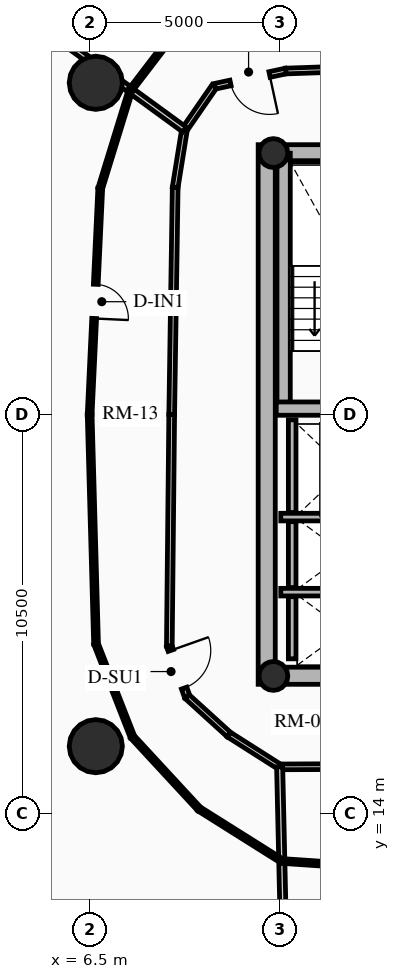
"""IFC4 building model, lengths in metres.
Left out: names, types, materials, properties, quantities, classifications, styles, units other than length and angle.
Written with IfcOpenShell. Run it as: python <this file> out.ifc"""

import sys

from ifc_helpers import new_model, si_unit, direction, frame, frame_2d, origin, origin_2d, place, context, subcontext, project, spatial, rectangle, circle, hollow_circle, extrude, source, transform, mapped, element, fill, save


model = new_model("IFC4")
c1 = context("Model", 3, precision=1e-05, world=origin(), true_north=direction((0.0, 1.0)))
c2 = subcontext(c1, "Body", "Model", "MODEL_VIEW")
j1 = project(units=[si_unit("LENGTHUNIT", "METRE"), si_unit("PLANEANGLEUNIT", "RADIAN")], contexts=[c1])
p1 = place(None, origin())
s1 = spatial("IfcSite", under=j1, at=p1, CompositionType="ELEMENT")
p2 = place(p1, origin())
s2 = spatial("IfcBuilding", under=s1, at=p2, CompositionType="ELEMENT")
p3 = place(p2, frame((0.0, 0.0, 90.52)))
s3 = spatial("IfcBuildingStorey", under=s2, at=p3, CompositionType="ELEMENT", Elevation=90.52)
p4 = place(p3, frame((11.15, 17.4, 0.0), z_axis=(0.0, 0.0, 1.0), x_axis=(0.0, 1.0, 0.0)))
e1 = element("IfcWall", 1, at=p4, inside=s3, PredefinedType="SHEAR", context=c2, shape_type="SweptSolid", body=[
    extrude(rectangle(XDim=14.2, YDim=0.45, at=frame_2d((7.1, 0.0))), origin(), (0.0, 0.0, 1.0), 2.91),
])
p5 = place(p3, frame((11.15, 17.625, 0.0), z_axis=(0.0, 0.0, 1.0), x_axis=(1.0, 0.0, 0.0)))
e2 = element("IfcWall", 2, at=p5, inside=s3, PredefinedType="SHEAR", context=c2, shape_type="SweptSolid", body=[
    extrude(rectangle(XDim=10.7, YDim=0.45, at=frame_2d((5.35, 0.0))), origin(), (0.0, 0.0, 1.0), 2.91),
])
m1 = source(origin(), c2, "Body", "SweptSolid", [
    extrude(rectangle(XDim=1.5, YDim=2.02, at=frame_2d((0.75, 1.01))), frame((0.0, 0.235, 0.0), z_axis=(0.0, -1.0, 0.0), x_axis=(1.0, 0.0, 0.0)), (0.0, 0.0, 1.0), 0.47),
])
p6 = place(p5, frame((5.45, 0.0, 0.0)))
e3 = element("IfcOpeningElement", 3, at=p6, cuts=e2, PredefinedType="OPENING", context=c2, shape_type="MappedRepresentation", body=[
    mapped(m1, transform((0.0, 0.0, 0.0), x_axis=(1.0, 0.0, 0.0), y_axis=(0.0, 1.0, 0.0), z_axis=(0.0, 0.0, 1.0), scale=1.0)),
])
p7 = place(p3, frame((11.15, 31.375, 0.0), z_axis=(0.0, 0.0, 1.0), x_axis=(1.0, 0.0, 0.0)))
e4 = element("IfcWall", 4, at=p7, inside=s3, PredefinedType="SHEAR", context=c2, shape_type="SweptSolid", body=[
    extrude(rectangle(XDim=10.7, YDim=0.45, at=frame_2d((5.35, 0.0))), origin(), (0.0, 0.0, 1.0), 2.91),
])
p8 = place(p7, frame((4.6, 0.0, 0.0)))
e5 = element("IfcOpeningElement", 5, at=p8, cuts=e4, PredefinedType="OPENING", context=c2, shape_type="MappedRepresentation", body=[
    mapped(m1, transform((0.0, 0.0, 0.0), x_axis=(1.0, 0.0, 0.0), y_axis=(0.0, 1.0, 0.0), z_axis=(0.0, 0.0, 1.0), scale=1.0)),
])
p9 = place(p3, frame((11.595, 24.655, 0.0), z_axis=(0.0, 0.0, 1.0), x_axis=(0.0, 1.0, 0.0)))
e6 = element("IfcWall", 6, at=p9, inside=s3, PredefinedType="SHEAR", context=c2, shape_type="SweptSolid", body=[
    extrude(rectangle(XDim=6.72, YDim=0.35, at=frame_2d((3.36, 0.0))), origin(), (0.0, 0.0, 1.0), 2.91),
])
p10 = place(p3, frame((11.4, 24.655, 0.0), z_axis=(0.0, 0.0, 1.0), x_axis=(1.0, 0.0, 0.0)))
e7 = element("IfcWall", 7, at=p10, inside=s3, PredefinedType="SHEAR", context=c2, shape_type="SweptSolid", body=[
    extrude(rectangle(XDim=3.285, YDim=0.35, at=frame_2d((1.643, 0.0))), origin(), (0.0, 0.0, 1.0), 2.91),
])
for number, where, z_axis, x_axis in (
    (8, (11.325, 17.62, 0.0), (0.0, 0.0, 1.0), (1.0, 0.0, 0.0)),
    (9, (11.325, 31.38, 0.0), (0.0, 0.0, 1.0), (1.0, 0.0, 0.0)),
):
    element("IfcColumn", number, at=place(p3, frame(where, z_axis=z_axis, x_axis=x_axis)), inside=s3, PredefinedType="COLUMN", context=c2, shape_type="SweptSolid", body=[
        extrude(hollow_circle(Radius=0.38, WallThickness=0.032, at=origin_2d()), origin(), (0.0, 0.0, 1.0), 2.91),
    ])
for number, where, z_axis, x_axis in (
    (10, (6.653, 33.229, 0.0), (0.0, 0.0, 1.0), (1.0, 0.0, 0.0)),
    (11, (6.653, 15.771, 0.0), (0.0, 0.0, 1.0), (1.0, 0.0, 0.0)),
):
    element("IfcColumn", number, at=place(p3, frame(where, z_axis=z_axis, x_axis=x_axis)), inside=s3, PredefinedType="USERDEFINED", context=c2, shape_type="SweptSolid", body=[
        extrude(circle(Radius=0.7, at=origin_2d()), origin(), (0.0, 0.0, 1.0), 2.91),
    ])
p11 = place(p3, frame((7.342, 9.072, 0.0), z_axis=(0.0, 0.0, 1.0), x_axis=(-0.632700781152, 0.77439635945, 0.0)))
e12 = element("IfcWall", 12, at=p11, inside=s3, PredefinedType="SOLIDWALL", context=c2, shape_type="SweptSolid", body=[
    extrude(rectangle(XDim=5.448, YDim=0.24, at=frame_2d((2.724, 0.0))), origin(), (0.0, 0.0, 1.0), 2.179),
])
p12 = place(p3, frame((11.52, 21.8, 0.0), z_axis=(0.0, 0.0, 1.0), x_axis=(1.0, 0.0, 0.0)))
e13 = element("IfcWall", 13, at=p12, inside=s3, PredefinedType="SHEAR", context=c2, shape_type="SweptSolid", body=[
    extrude(rectangle(XDim=2.97, YDim=0.2, at=frame_2d((1.485, 0.0))), origin(), (0.0, 0.0, 1.0), 2.91),
])
p13 = place(p3, frame((11.82, 21.92, 0.0), z_axis=(0.0, 0.0, 1.0), x_axis=(0.0, 1.0, 0.0)))
e14 = element("IfcWall", 14, at=p13, inside=s3, PredefinedType="SHEAR", context=c2, shape_type="SweptSolid", body=[
    extrude(rectangle(XDim=2.44, YDim=0.2, at=frame_2d((1.22, 0.0))), origin(), (0.0, 0.0, 1.0), 2.91),
])
p14 = place(p3, frame((11.52, 19.825, 0.0), z_axis=(0.0, 0.0, 1.0), x_axis=(1.0, 0.0, 0.0)))
e15 = element("IfcWall", 15, at=p14, inside=s3, PredefinedType="SHEAR", context=c2, shape_type="SweptSolid", body=[
    extrude(rectangle(XDim=2.97, YDim=0.2, at=frame_2d((1.485, 0.0))), origin(), (0.0, 0.0, 1.0), 2.91),
])
p15 = place(p3, frame((11.82, 19.945, 0.0), z_axis=(0.0, 0.0, 1.0), x_axis=(0.0, 1.0, 0.0)))
e16 = element("IfcWall", 16, at=p15, inside=s3, PredefinedType="SHEAR", context=c2, shape_type="SweptSolid", body=[
    extrude(rectangle(XDim=1.735, YDim=0.2, at=frame_2d((0.867, 0.0))), origin(), (0.0, 0.0, 1.0), 2.91),
])
p16 = place(p3, frame((11.82, 18.07, 0.0), z_axis=(0.0, 0.0, 1.0), x_axis=(0.0, 1.0, 0.0)))
e17 = element("IfcWall", 17, at=p16, inside=s3, PredefinedType="SHEAR", context=c2, shape_type="SweptSolid", body=[
    extrude(rectangle(XDim=1.635, YDim=0.2, at=frame_2d((0.817, 0.0))), origin(), (0.0, 0.0, 1.0), 2.91),
])
p17 = place(p3, frame((18.133, 33.76, 0.0), z_axis=(0.0, 0.0, 1.0), x_axis=(-0.999419643988, -0.034064280574, 0.0)))
e18 = element("IfcWall", 18, at=p17, inside=s3, PredefinedType="PARTITIONING", context=c2, shape_type="SweptSolid", body=[
    extrude(rectangle(XDim=6.486, YDim=0.15, at=frame_2d((3.243, 0.0))), origin(), (0.0, 0.0, 1.0), 2.225),
])
p18 = place(p3, frame((11.65, 33.539, 0.0), z_axis=(0.0, 0.0, 1.0), x_axis=(-0.977535921581, -0.210768882949, 0.0)))
e19 = element("IfcWall", 19, at=p18, inside=s3, PredefinedType="PARTITIONING", context=c2, shape_type="SweptSolid", body=[
    extrude(rectangle(XDim=1.923, YDim=0.15, at=frame_2d((0.961, 0.0))), origin(), (0.0, 0.0, 1.0), 2.225),
])
m2 = source(origin(), c2, "Body", "SweptSolid", [
    extrude(rectangle(XDim=1.05, YDim=2.015, at=frame_2d((0.525, 1.007))), frame((0.0, 0.085, 0.0), z_axis=(0.0, -1.0, 0.0), x_axis=(1.0, 0.0, 0.0)), (0.0, 0.0, 1.0), 0.17),
])
p19 = place(p18, frame((0.436, 0.0, 0.0)))
e20 = element("IfcOpeningElement", 20, at=p19, cuts=e19, PredefinedType="OPENING", context=c2, shape_type="MappedRepresentation", body=[
    mapped(m2, transform((0.0, 0.0, 0.0), x_axis=(1.0, 0.0, 0.0), y_axis=(0.0, 1.0, 0.0), z_axis=(0.0, 0.0, 1.0), scale=1.0)),
])
p20 = place(p3, frame((9.771, 33.133, 0.0), z_axis=(0.0, 0.0, 1.0), x_axis=(-0.568464531016, -0.822707771312, 0.0)))
e21 = element("IfcWall", 21, at=p20, inside=s3, PredefinedType="PARTITIONING", context=c2, shape_type="SweptSolid", body=[
    extrude(rectangle(XDim=1.38, YDim=0.15, at=frame_2d((0.69, 0.0))), origin(), (0.0, 0.0, 1.0), 2.225),
])
p21 = place(p3, frame((8.986, 31.998, 0.0), z_axis=(0.0, 0.0, 1.0), x_axis=(-0.158992972351, -0.98727971454, 0.0)))
e22 = element("IfcWall", 22, at=p21, inside=s3, PredefinedType="PARTITIONING", context=c2, shape_type="SweptSolid", body=[
    extrude(rectangle(XDim=1.539, YDim=0.15, at=frame_2d((0.769, 0.0))), origin(), (0.0, 0.0, 1.0), 2.225),
])
p22 = place(p3, frame((8.742, 30.479, 0.0), z_axis=(0.0, 0.0, 1.0), x_axis=(-0.015351396174, -0.999882160375, 0.0)))
e23 = element("IfcWall", 23, at=p22, inside=s3, PredefinedType="PARTITIONING", context=c2, shape_type="SweptSolid", body=[
    extrude(rectangle(XDim=5.98, YDim=0.15, at=frame_2d((2.99, 0.0))), origin(), (0.0, 0.0, 1.0), 2.655),
])
p23 = place(p3, frame((8.65, 24.5, 0.0), z_axis=(0.0, 0.0, 1.0), x_axis=(-0.010250943023, -0.999947457703, 0.0)))
e24 = element("IfcWall", 24, at=p23, inside=s3, PredefinedType="PARTITIONING", context=c2, shape_type="SweptSolid", body=[
    extrude(rectangle(XDim=6.097, YDim=0.15, at=frame_2d((3.048, 0.0))), origin(), (0.0, 0.0, 1.0), 2.225),
])
p24 = place(p3, frame((8.587, 18.403, 0.0), z_axis=(0.0, 0.0, 1.0), x_axis=(0.333119120686, -0.942884749815, 0.0)))
e25 = element("IfcWall", 25, at=p24, inside=s3, PredefinedType="PARTITIONING", context=c2, shape_type="SweptSolid", body=[
    extrude(rectangle(XDim=1.409, YDim=0.15, at=frame_2d((0.705, 0.0))), origin(), (0.0, 0.0, 1.0), 2.225),
])
p25 = place(p24, frame((0.12, 0.0, 0.0)))
e26 = element("IfcOpeningElement", 26, at=p25, cuts=e25, PredefinedType="OPENING", context=c2, shape_type="MappedRepresentation", body=[
    mapped(m2, transform((0.0, 0.0, 0.0), x_axis=(1.0, 0.0, 0.0), y_axis=(0.0, 1.0, 0.0), z_axis=(0.0, 0.0, 1.0), scale=1.0)),
])
p26 = place(p3, frame((9.057, 17.074, 0.0), z_axis=(0.0, 0.0, 1.0), x_axis=(0.739999571423, -0.672607340351, 0.0)))
e27 = element("IfcWall", 27, at=p26, inside=s3, PredefinedType="PARTITIONING", context=c2, shape_type="SweptSolid", body=[
    extrude(rectangle(XDim=1.485, YDim=0.15, at=frame_2d((0.743, 0.0))), origin(), (0.0, 0.0, 1.0), 2.225),
])
p27 = place(p3, frame((10.156, 16.075, 0.0), z_axis=(0.0, 0.0, 1.0), x_axis=(0.843896624713, -0.536505812455, 0.0)))
e28 = element("IfcWall", 28, at=p27, inside=s3, PredefinedType="PARTITIONING", context=c2, shape_type="SweptSolid", body=[
    extrude(rectangle(XDim=1.581, YDim=0.15, at=frame_2d((0.791, 0.0))), origin(), (0.0, 0.0, 1.0), 2.225),
])
p28 = place(p3, frame((11.49, 15.227, 0.0), z_axis=(0.0, 0.0, 1.0), x_axis=(0.999991728046, 0.004067411998, 0.0)))
e29 = element("IfcWall", 29, at=p28, inside=s3, PredefinedType="PARTITIONING", context=c2, shape_type="SweptSolid", body=[
    extrude(rectangle(XDim=3.301, YDim=0.15, at=frame_2d((1.651, 0.0))), origin(), (0.0, 0.0, 1.0), 2.225),
])
p29 = place(p3, frame((8.986, 31.998, 0.0), z_axis=(0.0, 0.0, 1.0), x_axis=(-0.808130498411, 0.589003478375, 0.0)))
e30 = element("IfcWall", 30, at=p29, inside=s3, PredefinedType="PARTITIONING", context=c2, shape_type="SweptSolid", body=[
    extrude(rectangle(XDim=6.281, YDim=0.16, at=frame_2d((3.14, 0.0))), origin(), (0.0, 0.0, 1.0), 2.179),
])
p30 = place(p3, frame((11.49, 15.227, 0.0), z_axis=(0.0, 0.0, 1.0), x_axis=(0.022711375682, -0.999742063442, 0.0)))
e31 = element("IfcWall", 31, at=p30, inside=s3, PredefinedType="PARTITIONING", context=c2, shape_type="SweptSolid", body=[
    extrude(rectangle(XDim=8.847, YDim=0.16, at=frame_2d((4.423, 0.0))), origin(), (0.0, 0.0, 1.0), 2.179),
])
p31 = place(p3, frame((9.094, 35.031, 0.0), z_axis=(0.0, 0.0, 1.0), x_axis=(-0.607813927368, -0.794079485755, 0.0)))
e32 = element("IfcWall", 32, at=p31, inside=s3, PredefinedType="PARTITIONING", context=c2, shape_type="SweptSolid", body=[
    extrude(rectangle(XDim=2.515, YDim=0.125, at=frame_2d((1.258, 0.0))), origin(), (0.0, 0.0, 1.0), 2.655),
])
p32 = place(p3, frame((7.565, 33.034, 0.0), z_axis=(0.0, 0.0, 1.0), x_axis=(-0.294365365095, -0.955692958974, 0.0)))
e33 = element("IfcWall", 33, at=p32, inside=s3, PredefinedType="PARTITIONING", context=c2, shape_type="SweptSolid", body=[
    extrude(rectangle(XDim=2.7, YDim=0.125, at=frame_2d((1.35, 0.0))), origin(), (0.0, 0.0, 1.0), 2.225),
])
p33 = place(p3, frame((6.77, 30.453, 0.0), z_axis=(0.0, 0.0, 1.0), x_axis=(-0.046864461883, -0.998901257489, 0.0)))
e34 = element("IfcWall", 34, at=p33, inside=s3, PredefinedType="PARTITIONING", context=c2, shape_type="SweptSolid", body=[
    extrude(rectangle(XDim=5.96, YDim=0.125, at=frame_2d((2.98, 0.0))), origin(), (0.0, 0.0, 1.0), 2.655),
])
m3 = source(origin(), c2, "Body", "SweptSolid", [
    extrude(rectangle(XDim=0.9, YDim=2.005, at=frame_2d((0.45, 1.002))), frame((0.0, 0.073, 0.0), z_axis=(0.0, -1.0, 0.0), x_axis=(1.0, 0.0, 0.0)), (0.0, 0.0, 1.0), 0.145),
])
p34 = place(p33, frame((2.53, 0.0, 0.0)))
e35 = element("IfcOpeningElement", 35, at=p34, cuts=e34, PredefinedType="OPENING", context=c2, shape_type="MappedRepresentation", body=[
    mapped(m3, transform((0.0, 0.0, 0.0), x_axis=(1.0, 0.0, 0.0), y_axis=(0.0, 1.0, 0.0), z_axis=(0.0, 0.0, 1.0), scale=1.0)),
])
p35 = place(p3, frame((6.491, 24.5, 0.0), z_axis=(0.0, 0.0, 1.0), x_axis=(0.027808577393, -0.99961326673, 0.0)))
e36 = element("IfcWall", 36, at=p35, inside=s3, PredefinedType="PARTITIONING", context=c2, shape_type="SweptSolid", body=[
    extrude(rectangle(XDim=6.04, YDim=0.125, at=frame_2d((3.02, 0.0))), origin(), (0.0, 0.0, 1.0), 2.225),
])
p36 = place(p3, frame((6.659, 18.462, 0.0), z_axis=(0.0, 0.0, 1.0), x_axis=(0.364644852064, -0.931146675805, 0.0)))
e37 = element("IfcWall", 37, at=p36, inside=s3, PredefinedType="PARTITIONING", context=c2, shape_type="SweptSolid", body=[
    extrude(rectangle(XDim=2.625, YDim=0.125, at=frame_2d((1.312, 0.0))), origin(), (0.0, 0.0, 1.0), 2.225),
])
p37 = place(p3, frame((7.616, 16.018, 0.0), z_axis=(0.0, 0.0, 1.0), x_axis=(0.67871125453, -0.734405223956, 0.0)))
e38 = element("IfcWall", 38, at=p37, inside=s3, PredefinedType="PARTITIONING", context=c2, shape_type="SweptSolid", body=[
    extrude(rectangle(XDim=2.586, YDim=0.125, at=frame_2d((1.293, 0.0))), origin(), (0.0, 0.0, 1.0), 2.655),
])
p38 = place(p3, frame((9.371, 14.119, 0.0), z_axis=(0.0, 0.0, 1.0), x_axis=(0.846446940893, -0.532473075613, 0.0)))
e39 = element("IfcWall", 39, at=p38, inside=s3, PredefinedType="PARTITIONING", context=c2, shape_type="SweptSolid", body=[
    extrude(rectangle(XDim=2.57, YDim=0.125, at=frame_2d((1.285, 0.0))), origin(), (0.0, 0.0, 1.0), 2.225),
])
p39 = place(p3, frame((11.547, 12.75, 0.0), z_axis=(0.0, 0.0, 1.0), x_axis=(0.997731575096, -0.067317932645, 0.0)))
e40 = element("IfcWall", 40, at=p39, inside=s3, PredefinedType="PARTITIONING", context=c2, shape_type="SweptSolid", body=[
    extrude(rectangle(XDim=3.732, YDim=0.125, at=frame_2d((1.866, 0.0))), origin(), (0.0, 0.0, 1.0), 2.225),
])
m4 = source(origin(), c2, "Body", "SweptSolid", [
    extrude(rectangle(XDim=1.05, YDim=2.015, at=frame_2d((0.525, 1.007))), frame((0.0, 0.025, 0.0), z_axis=(0.0, -1.0, 0.0), x_axis=(1.0, 0.0, 0.0)), (0.0, 0.0, 1.0), 0.05),
])
p40 = place(p19, origin())
e41 = element("IfcDoor", 41, at=p40, inside=s3, OperationType="SINGLE_SWING_LEFT", PredefinedType="DOOR", context=c2, shape_type="MappedRepresentation", body=[
    mapped(m4, transform((0.0, 0.0, 0.0), x_axis=(1.0, 0.0, 0.0), y_axis=(0.0, 1.0, 0.0), z_axis=(0.0, 0.0, 1.0), scale=1.0)),
])
fill(e20, e41)
p41 = place(p25, origin())
e42 = element("IfcDoor", 42, at=p41, inside=s3, OperationType="SINGLE_SWING_LEFT", PredefinedType="DOOR", context=c2, shape_type="MappedRepresentation", body=[
    mapped(m4, transform((0.0, 0.0, 0.0), x_axis=(1.0, 0.0, 0.0), y_axis=(0.0, 1.0, 0.0), z_axis=(0.0, 0.0, 1.0), scale=1.0)),
])
fill(e26, e42)
m5 = source(origin(), c2, "Body", "SweptSolid", [
    extrude(rectangle(XDim=0.9, YDim=2.005, at=frame_2d((0.45, 1.002))), frame((0.0, 0.025, 0.0), z_axis=(0.0, -1.0, 0.0), x_axis=(1.0, 0.0, 0.0)), (0.0, 0.0, 1.0), 0.05),
])
p42 = place(p34, origin())
e43 = element("IfcDoor", 43, at=p42, inside=s3, OperationType="SINGLE_SWING_RIGHT", PredefinedType="DOOR", context=c2, shape_type="MappedRepresentation", body=[
    mapped(m5, transform((0.0, 0.0, 0.0), x_axis=(1.0, 0.0, 0.0), y_axis=(0.0, 1.0, 0.0), z_axis=(0.0, 0.0, 1.0), scale=1.0)),
])
fill(e35, e43)
save(model, sys.argv[1])
